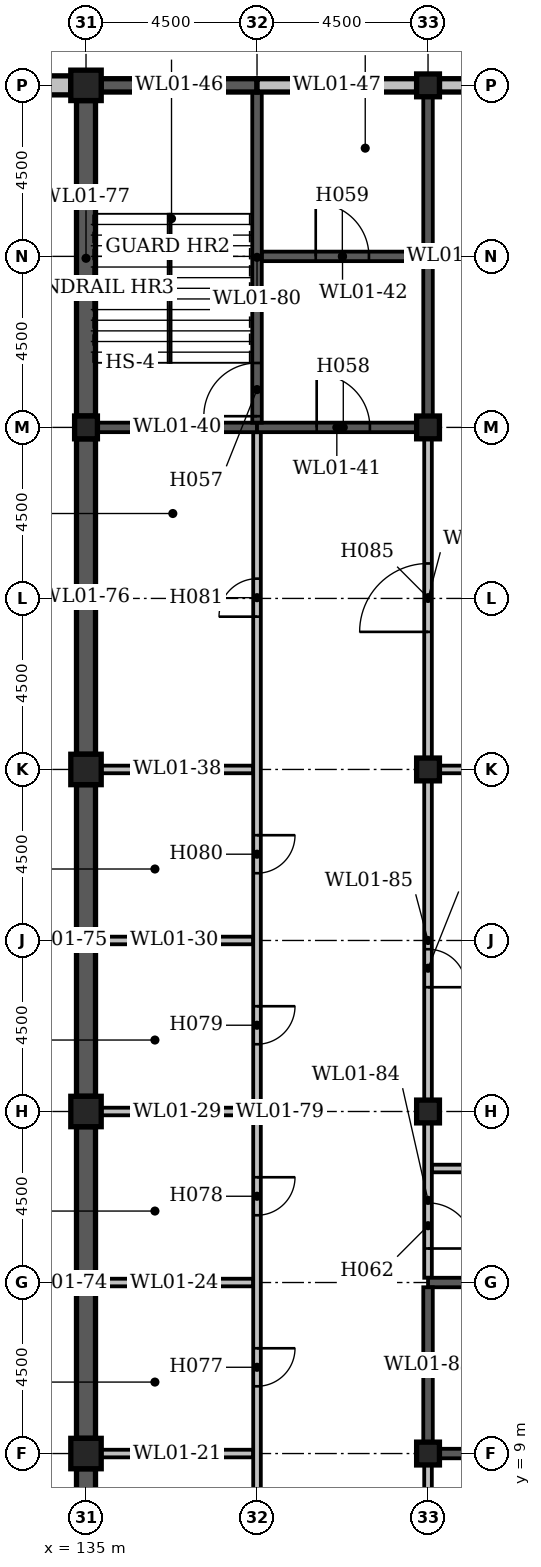
"""IFC4 building model, lengths in metres.
Left out: names, types, materials, properties, quantities, classifications, styles, units other than length and angle.
Written with IfcOpenShell. Run it as: python <this file> out.ifc"""

import sys

from ifc_helpers import new_model, si_unit, direction, frame, frame_2d, origin, origin_2d, place, context, subcontext, project, spatial, rectangle, extrude, element, fill, save


model = new_model("IFC4")
c1 = context("Model", 3, precision=1e-05, world=origin(), true_north=direction((0.0, 1.0)))
c2 = subcontext(c1, "Body", "Model", "MODEL_VIEW")
j1 = project(units=[si_unit("LENGTHUNIT", "METRE"), si_unit("PLANEANGLEUNIT", "RADIAN")], contexts=[c1])
p1 = place(None, origin())
s1 = spatial("IfcSite", under=j1, at=p1, CompositionType="ELEMENT")
p2 = place(p1, origin())
s2 = spatial("IfcBuilding", under=s1, at=p2, CompositionType="ELEMENT")
p3 = place(p2, frame((0.0, 0.0, 9.0)))
s3 = spatial("IfcBuildingStorey", under=s2, at=p3, CompositionType="ELEMENT", Elevation=9.0)
for number, where, z_axis, x_axis in (
    (1, (135.0, 9.0, -0.3), (0.0, 0.0, 1.0), (1.0, 0.0, 0.0)),
    (2, (135.0, 18.0, -0.3), (0.0, 0.0, 1.0), (1.0, 0.0, 0.0)),
    (3, (135.0, 27.0, -0.3), (0.0, 0.0, 1.0), (1.0, 0.0, 0.0)),
):
    element("IfcColumn", number, at=place(p3, frame(where, z_axis=z_axis, x_axis=x_axis)), inside=s3, PredefinedType="COLUMN", context=c2, shape_type="SweptSolid", body=[
        extrude(rectangle(XDim=0.8, YDim=0.8, at=origin_2d()), origin(), (0.0, 0.0, 1.0), 5.0),
    ])
p4 = place(p3, frame((135.0, 36.0, -0.3), z_axis=(0.0, 0.0, 1.0), x_axis=(1.0, 0.0, 0.0)))
e4 = element("IfcColumn", 4, at=p4, inside=s3, PredefinedType="COLUMN", context=c2, shape_type="SweptSolid", body=[
    extrude(rectangle(XDim=0.6, YDim=0.6, at=origin_2d()), origin(), (0.0, 0.0, 1.0), 5.0),
])
p5 = place(p3, frame((135.0, 45.0, -0.3), z_axis=(0.0, 0.0, 1.0), x_axis=(1.0, 0.0, 0.0)))
e5 = element("IfcColumn", 5, at=p5, inside=s3, PredefinedType="COLUMN", context=c2, shape_type="SweptSolid", body=[
    extrude(rectangle(XDim=0.8, YDim=0.8, at=origin_2d()), origin(), (0.0, 0.0, 1.0), 5.0),
])
for number, where, z_axis, x_axis in (
    (6, (144.0, 9.0, 0.0), (0.0, 0.0, 1.0), (1.0, 0.0, 0.0)),
    (7, (144.0, 18.0, 0.0), (0.0, 0.0, 1.0), (1.0, 0.0, 0.0)),
    (8, (144.0, 27.0, 0.0), (0.0, 0.0, 1.0), (1.0, 0.0, 0.0)),
    (9, (144.0, 36.0, 0.0), (0.0, 0.0, 1.0), (1.0, 0.0, 0.0)),
    (10, (144.0, 45.0, 0.0), (0.0, 0.0, 1.0), (1.0, 0.0, 0.0)),
):
    element("IfcColumn", number, at=place(p3, frame(where, z_axis=z_axis, x_axis=x_axis)), inside=s3, PredefinedType="COLUMN", context=c2, shape_type="SweptSolid", body=[
        extrude(rectangle(XDim=0.6, YDim=0.6, at=origin_2d()), origin(), (0.0, 0.0, 1.0), 4.7),
    ])
p6 = place(p3, frame((135.4, 9.0, 0.0), z_axis=(0.0, 0.0, 1.0), x_axis=(1.0, 0.0, 0.0)))
e11 = element("IfcWall", 11, at=p6, inside=s3, PredefinedType="STANDARD", context=c2, shape_type="SweptSolid", body=[
    extrude(rectangle(XDim=4.0, YDim=0.2, at=frame_2d((2.0, 0.0))), origin(), (0.0, 0.0, 1.0), 4.7),
])
p7 = place(p3, frame((144.3, 9.0, 0.0), z_axis=(0.0, 0.0, 1.0), x_axis=(1.0, 0.0, 0.0)))
e12 = element("IfcWall", 12, at=p7, inside=s3, PredefinedType="STANDARD", context=c2, shape_type="SweptSolid", body=[
    extrude(rectangle(XDim=4.2, YDim=0.25, at=frame_2d((2.1, 0.0))), origin(), (0.0, 0.0, 1.0), 5.0),
])
p8 = place(p3, frame((135.25, 13.5, 0.0), z_axis=(0.0, 0.0, 1.0), x_axis=(1.0, 0.0, 0.0)))
e13 = element("IfcWall", 13, at=p8, inside=s3, PredefinedType="STANDARD", context=c2, shape_type="SweptSolid", body=[
    extrude(rectangle(XDim=4.15, YDim=0.2, at=frame_2d((2.075, 0.0))), origin(), (0.0, 0.0, 1.0), 4.7),
])
p9 = place(p3, frame((144.0, 13.5, 0.0), z_axis=(0.0, 0.0, 1.0), x_axis=(1.0, 0.0, 0.0)))
e14 = element("IfcWall", 14, at=p9, inside=s3, PredefinedType="STANDARD", context=c2, shape_type="SweptSolid", body=[
    extrude(rectangle(XDim=4.5, YDim=0.25, at=frame_2d((2.25, 0.0))), origin(), (0.0, 0.0, 1.0), 5.0),
])
p10 = place(p9, frame((1.72, 0.0, 0.0)))
e15 = element("IfcOpeningElement", 15, at=p10, cuts=e14, PredefinedType="OPENING", context=c2, shape_type="SweptSolid", body=[
    extrude(rectangle(XDim=1.1, YDim=2.1, at=frame_2d((0.55, 1.05))), frame((0.0, 0.137, 0.0), z_axis=(0.0, -1.0, 0.0), x_axis=(1.0, 0.0, 0.0)), (0.0, 0.0, 1.0), 0.274),
])
p11 = place(p3, frame((144.1, 16.5, 0.0), z_axis=(0.0, 0.0, 1.0), x_axis=(1.0, 0.0, 0.0)))
e16 = element("IfcWall", 16, at=p11, inside=s3, PredefinedType="STANDARD", context=c2, shape_type="SweptSolid", body=[
    extrude(rectangle(XDim=8.725, YDim=0.2, at=frame_2d((4.362, 0.0))), origin(), (0.0, 0.0, 1.0), 4.7),
])
p12 = place(p3, frame((135.4, 18.0, 0.0), z_axis=(0.0, 0.0, 1.0), x_axis=(1.0, 0.0, 0.0)))
e17 = element("IfcWall", 17, at=p12, inside=s3, PredefinedType="STANDARD", context=c2, shape_type="SweptSolid", body=[
    extrude(rectangle(XDim=4.0, YDim=0.2, at=frame_2d((2.0, 0.0))), origin(), (0.0, 0.0, 1.0), 4.7),
])
p13 = place(p3, frame((135.25, 22.5, 0.0), z_axis=(0.0, 0.0, 1.0), x_axis=(1.0, 0.0, 0.0)))
e18 = element("IfcWall", 18, at=p13, inside=s3, PredefinedType="STANDARD", context=c2, shape_type="SweptSolid", body=[
    extrude(rectangle(XDim=4.15, YDim=0.2, at=frame_2d((2.075, 0.0))), origin(), (0.0, 0.0, 1.0), 4.7),
])
p14 = place(p3, frame((135.4, 27.0, 0.0), z_axis=(0.0, 0.0, 1.0), x_axis=(1.0, 0.0, 0.0)))
e19 = element("IfcWall", 19, at=p14, inside=s3, PredefinedType="STANDARD", context=c2, shape_type="SweptSolid", body=[
    extrude(rectangle(XDim=4.0, YDim=0.2, at=frame_2d((2.0, 0.0))), origin(), (0.0, 0.0, 1.0), 4.7),
])
p15 = place(p3, frame((144.3, 27.0, 0.0), z_axis=(0.0, 0.0, 1.0), x_axis=(1.0, 0.0, 0.0)))
e20 = element("IfcWall", 20, at=p15, inside=s3, PredefinedType="STANDARD", context=c2, shape_type="SweptSolid", body=[
    extrude(rectangle(XDim=8.4, YDim=0.2, at=frame_2d((4.2, 0.0))), origin(), (0.0, 0.0, 1.0), 4.7),
])
p16 = place(p3, frame((135.3, 36.0, 0.0), z_axis=(0.0, 0.0, 1.0), x_axis=(1.0, 0.0, 0.0)))
e21 = element("IfcWall", 21, at=p16, inside=s3, PredefinedType="STANDARD", context=c2, shape_type="SweptSolid", body=[
    extrude(rectangle(XDim=4.2, YDim=0.25, at=frame_2d((2.1, 0.0))), origin(), (0.0, 0.0, 1.0), 5.0),
])
p17 = place(p3, frame((139.5, 36.0, 0.0), z_axis=(0.0, 0.0, 1.0), x_axis=(1.0, 0.0, 0.0)))
e22 = element("IfcWall", 22, at=p17, inside=s3, PredefinedType="STANDARD", context=c2, shape_type="SweptSolid", body=[
    extrude(rectangle(XDim=4.2, YDim=0.25, at=frame_2d((2.1, 0.0))), origin(), (0.0, 0.0, 1.0), 4.7),
])
p18 = place(p17, frame((1.57, 0.0, 0.0)))
e23 = element("IfcOpeningElement", 23, at=p18, cuts=e22, PredefinedType="OPENING", context=c2, shape_type="SweptSolid", body=[
    extrude(rectangle(XDim=1.4, YDim=2.1, at=frame_2d((0.7, 1.05))), frame((0.0, 0.137, 0.0), z_axis=(0.0, -1.0, 0.0), x_axis=(1.0, 0.0, 0.0)), (0.0, 0.0, 1.0), 0.274),
])
p19 = place(p3, frame((139.625, 40.5, 0.0), z_axis=(0.0, 0.0, 1.0), x_axis=(1.0, 0.0, 0.0)))
e24 = element("IfcWall", 24, at=p19, inside=s3, PredefinedType="STANDARD", context=c2, shape_type="SweptSolid", body=[
    extrude(rectangle(XDim=4.25, YDim=0.25, at=frame_2d((2.125, 0.0))), origin(), (0.0, 0.0, 1.0), 4.7),
])
p20 = place(p19, frame((1.42, 0.0, 0.0)))
e25 = element("IfcOpeningElement", 25, at=p20, cuts=e24, PredefinedType="OPENING", context=c2, shape_type="SweptSolid", body=[
    extrude(rectangle(XDim=1.4, YDim=2.1, at=frame_2d((0.7, 1.05))), frame((0.0, 0.137, 0.0), z_axis=(0.0, -1.0, 0.0), x_axis=(1.0, 0.0, 0.0)), (0.0, 0.0, 1.0), 0.274),
])
p21 = place(p3, frame((126.3, 45.0, 0.0), z_axis=(0.0, 0.0, 1.0), x_axis=(1.0, 0.0, 0.0)))
e26 = element("IfcWall", 26, at=p21, inside=s3, PredefinedType="STANDARD", context=c2, shape_type="SweptSolid", body=[
    extrude(rectangle(XDim=8.3, YDim=0.5, at=frame_2d((4.15, 0.0))), origin(), (0.0, 0.0, 1.0), 5.0),
])
p22 = place(p3, frame((135.4, 45.0, 0.0), z_axis=(0.0, 0.0, 1.0), x_axis=(1.0, 0.0, 0.0)))
e27 = element("IfcWall", 27, at=p22, inside=s3, PredefinedType="STANDARD", context=c2, shape_type="SweptSolid", body=[
    extrude(rectangle(XDim=4.1, YDim=0.35, at=frame_2d((2.05, 0.0))), origin(), (0.0, 0.0, 1.0), 5.0),
])
p23 = place(p3, frame((139.5, 45.0, 0.0), z_axis=(0.0, 0.0, 1.0), x_axis=(1.0, 0.0, 0.0)))
e28 = element("IfcWall", 28, at=p23, inside=s3, PredefinedType="STANDARD", context=c2, shape_type="SweptSolid", body=[
    extrude(rectangle(XDim=4.2, YDim=0.35, at=frame_2d((2.1, 0.0))), origin(), (0.0, 0.0, 1.0), 4.1),
])
p24 = place(p3, frame((144.3, 45.0, 0.0), z_axis=(0.0, 0.0, 1.0), x_axis=(1.0, 0.0, 0.0)))
e29 = element("IfcWall", 29, at=p24, inside=s3, PredefinedType="STANDARD", context=c2, shape_type="SweptSolid", body=[
    extrude(rectangle(XDim=8.35, YDim=0.35, at=frame_2d((4.175, 0.0))), origin(), (0.0, 0.0, 1.0), 4.1),
])
p25 = place(p24, frame((1.337, 0.0, 1.0)))
e30 = element("IfcOpeningElement", 30, at=p25, cuts=e29, PredefinedType="OPENING", context=c2, shape_type="SweptSolid", body=[
    extrude(rectangle(XDim=1.5, YDim=2.4, at=frame_2d((0.75, 1.2))), frame((0.0, 0.187, 0.0), z_axis=(0.0, -1.0, 0.0), x_axis=(1.0, 0.0, 0.0)), (0.0, 0.0, 1.0), 0.374),
])
p26 = place(p24, frame((5.512, 0.0, 1.0)))
e31 = element("IfcOpeningElement", 31, at=p26, cuts=e29, PredefinedType="OPENING", context=c2, shape_type="SweptSolid", body=[
    extrude(rectangle(XDim=1.5, YDim=2.4, at=frame_2d((0.75, 1.2))), frame((0.0, 0.187, 0.0), z_axis=(0.0, -1.0, 0.0), x_axis=(1.0, 0.0, 0.0)), (0.0, 0.0, 1.0), 0.374),
])
for number, where, z_axis, x_axis in (
    (32, (135.0, 0.4, 0.0), (0.0, 0.0, 1.0), (0.0, 1.0, 0.0)),
    (33, (135.0, 9.4, 0.0), (0.0, 0.0, 1.0), (0.0, 1.0, 0.0)),
    (34, (135.0, 18.4, 0.0), (0.0, 0.0, 1.0), (0.0, 1.0, 0.0)),
):
    element("IfcWall", number, at=place(p3, frame(where, z_axis=z_axis, x_axis=x_axis)), inside=s3, PredefinedType="STANDARD", context=c2, shape_type="SweptSolid", body=[
        extrude(rectangle(XDim=8.2, YDim=0.5, at=frame_2d((4.1, 0.0))), origin(), (0.0, 0.0, 1.0), 5.0),
    ])
for number, where, z_axis, x_axis in (
    (35, (135.0, 27.4, 0.0), (0.0, 0.0, 1.0), (0.0, 1.0, 0.0)),
    (36, (135.0, 36.3, 0.0), (0.0, 0.0, 1.0), (0.0, 1.0, 0.0)),
):
    element("IfcWall", number, at=place(p3, frame(where, z_axis=z_axis, x_axis=x_axis)), inside=s3, PredefinedType="STANDARD", context=c2, shape_type="SweptSolid", body=[
        extrude(rectangle(XDim=8.3, YDim=0.5, at=frame_2d((4.15, 0.0))), origin(), (0.0, 0.0, 1.0), 5.0),
    ])
p27 = place(p3, frame((139.5, 0.1, 0.0), z_axis=(0.0, 0.0, 1.0), x_axis=(0.0, 1.0, 0.0)))
e37 = element("IfcWall", 37, at=p27, inside=s3, PredefinedType="STANDARD", context=c2, shape_type="SweptSolid", body=[
    extrude(rectangle(XDim=35.775, YDim=0.2, at=frame_2d((17.887, 0.0))), origin(), (0.0, 0.0, 1.0), 4.7),
])
p28 = place(p27, frame((6.17, 0.0, 0.0)))
e38 = element("IfcOpeningElement", 38, at=p28, cuts=e37, PredefinedType="OPENING", context=c2, shape_type="SweptSolid", body=[
    extrude(rectangle(XDim=1.0, YDim=2.1, at=frame_2d((0.5, 1.05))), frame((0.0, 0.112, 0.0), z_axis=(0.0, -1.0, 0.0), x_axis=(1.0, 0.0, 0.0)), (0.0, 0.0, 1.0), 0.224),
])
p29 = place(p27, frame((10.67, 0.0, 0.0)))
e39 = element("IfcOpeningElement", 39, at=p29, cuts=e37, PredefinedType="OPENING", context=c2, shape_type="SweptSolid", body=[
    extrude(rectangle(XDim=1.0, YDim=2.1, at=frame_2d((0.5, 1.05))), frame((0.0, 0.112, 0.0), z_axis=(0.0, -1.0, 0.0), x_axis=(1.0, 0.0, 0.0)), (0.0, 0.0, 1.0), 0.224),
])
p30 = place(p27, frame((15.17, 0.0, 0.0)))
e40 = element("IfcOpeningElement", 40, at=p30, cuts=e37, PredefinedType="OPENING", context=c2, shape_type="SweptSolid", body=[
    extrude(rectangle(XDim=1.0, YDim=2.1, at=frame_2d((0.5, 1.05))), frame((0.0, 0.112, 0.0), z_axis=(0.0, -1.0, 0.0), x_axis=(1.0, 0.0, 0.0)), (0.0, 0.0, 1.0), 0.224),
])
p31 = place(p27, frame((19.67, 0.0, 0.0)))
e41 = element("IfcOpeningElement", 41, at=p31, cuts=e37, PredefinedType="OPENING", context=c2, shape_type="SweptSolid", body=[
    extrude(rectangle(XDim=1.0, YDim=2.1, at=frame_2d((0.5, 1.05))), frame((0.0, 0.112, 0.0), z_axis=(0.0, -1.0, 0.0), x_axis=(1.0, 0.0, 0.0)), (0.0, 0.0, 1.0), 0.224),
])
p32 = place(p27, frame((24.17, 0.0, 0.0)))
e42 = element("IfcOpeningElement", 42, at=p32, cuts=e37, PredefinedType="OPENING", context=c2, shape_type="SweptSolid", body=[
    extrude(rectangle(XDim=1.0, YDim=2.1, at=frame_2d((0.5, 1.05))), frame((0.0, 0.112, 0.0), z_axis=(0.0, -1.0, 0.0), x_axis=(1.0, 0.0, 0.0)), (0.0, 0.0, 1.0), 0.224),
])
p33 = place(p27, frame((30.92, 0.0, 0.0)))
e43 = element("IfcOpeningElement", 43, at=p33, cuts=e37, PredefinedType="OPENING", context=c2, shape_type="SweptSolid", body=[
    extrude(rectangle(XDim=1.0, YDim=2.1, at=frame_2d((0.5, 1.05))), frame((0.0, 0.112, 0.0), z_axis=(0.0, -1.0, 0.0), x_axis=(1.0, 0.0, 0.0)), (0.0, 0.0, 1.0), 0.224),
])
p34 = place(p3, frame((139.5, 36.125, 0.0), z_axis=(0.0, 0.0, 1.0), x_axis=(0.0, 1.0, 0.0)))
e44 = element("IfcWall", 44, at=p34, inside=s3, PredefinedType="STANDARD", context=c2, shape_type="SweptSolid", body=[
    extrude(rectangle(XDim=8.7, YDim=0.25, at=frame_2d((4.35, 0.0))), origin(), (0.0, 0.0, 1.0), 5.0),
])
p35 = place(p34, frame((0.17, 0.0, 0.0)))
e45 = element("IfcOpeningElement", 45, at=p35, cuts=e44, PredefinedType="OPENING", context=c2, shape_type="SweptSolid", body=[
    extrude(rectangle(XDim=1.4, YDim=2.1, at=frame_2d((0.7, 1.05))), frame((0.0, 0.137, 0.0), z_axis=(0.0, -1.0, 0.0), x_axis=(1.0, 0.0, 0.0)), (0.0, 0.0, 1.0), 0.274),
])
p36 = place(p3, frame((144.0, 0.3, 0.0), z_axis=(0.0, 0.0, 1.0), x_axis=(0.0, 1.0, 0.0)))
e46 = element("IfcWall", 46, at=p36, inside=s3, PredefinedType="STANDARD", context=c2, shape_type="SweptSolid", body=[
    extrude(rectangle(XDim=8.4, YDim=0.2, at=frame_2d((4.2, 0.0))), origin(), (0.0, 0.0, 1.0), 4.7),
])
p37 = place(p36, frame((3.32, 0.0, 0.0)))
e47 = element("IfcOpeningElement", 47, at=p37, cuts=e46, PredefinedType="OPENING", context=c2, shape_type="SweptSolid", body=[
    extrude(rectangle(XDim=1.8, YDim=2.4, at=frame_2d((0.9, 1.2))), frame((0.0, 0.112, 0.0), z_axis=(0.0, -1.0, 0.0), x_axis=(1.0, 0.0, 0.0)), (0.0, 0.0, 1.0), 0.224),
])
p38 = place(p3, frame((144.0, 9.3, 0.0), z_axis=(0.0, 0.0, 1.0), x_axis=(0.0, 1.0, 0.0)))
e48 = element("IfcWall", 48, at=p38, inside=s3, PredefinedType="STANDARD", context=c2, shape_type="SweptSolid", body=[
    extrude(rectangle(XDim=4.075, YDim=0.25, at=frame_2d((2.038, 0.0))), origin(), (0.0, 0.0, 1.0), 5.0),
])
p39 = place(p3, frame((144.0, 13.625, 0.0), z_axis=(0.0, 0.0, 1.0), x_axis=(0.0, 1.0, 0.0)))
e49 = element("IfcWall", 49, at=p39, inside=s3, PredefinedType="STANDARD", context=c2, shape_type="SweptSolid", body=[
    extrude(rectangle(XDim=4.075, YDim=0.2, at=frame_2d((2.038, 0.0))), origin(), (0.0, 0.0, 1.0), 4.7),
])
p40 = place(p39, frame((0.77, 0.0, 0.0)))
e50 = element("IfcOpeningElement", 50, at=p40, cuts=e49, PredefinedType="OPENING", context=c2, shape_type="SweptSolid", body=[
    extrude(rectangle(XDim=1.2, YDim=2.1, at=frame_2d((0.6, 1.05))), frame((0.0, 0.112, 0.0), z_axis=(0.0, -1.0, 0.0), x_axis=(1.0, 0.0, 0.0)), (0.0, 0.0, 1.0), 0.224),
])
p41 = place(p3, frame((144.0, 18.3, 0.0), z_axis=(0.0, 0.0, 1.0), x_axis=(0.0, 1.0, 0.0)))
e51 = element("IfcWall", 51, at=p41, inside=s3, PredefinedType="STANDARD", context=c2, shape_type="SweptSolid", body=[
    extrude(rectangle(XDim=8.4, YDim=0.2, at=frame_2d((4.2, 0.0))), origin(), (0.0, 0.0, 1.0), 4.7),
])
p42 = place(p41, frame((2.97, 0.0, 0.0)))
e52 = element("IfcOpeningElement", 52, at=p42, cuts=e51, PredefinedType="OPENING", context=c2, shape_type="SweptSolid", body=[
    extrude(rectangle(XDim=1.0, YDim=2.1, at=frame_2d((0.5, 1.05))), frame((0.0, 0.112, 0.0), z_axis=(0.0, -1.0, 0.0), x_axis=(1.0, 0.0, 0.0)), (0.0, 0.0, 1.0), 0.224),
])
p43 = place(p3, frame((144.0, 27.3, 0.0), z_axis=(0.0, 0.0, 1.0), x_axis=(0.0, 1.0, 0.0)))
e53 = element("IfcWall", 53, at=p43, inside=s3, PredefinedType="STANDARD", context=c2, shape_type="SweptSolid", body=[
    extrude(rectangle(XDim=8.4, YDim=0.2, at=frame_2d((4.2, 0.0))), origin(), (0.0, 0.0, 1.0), 4.7),
])
p44 = place(p43, frame((3.32, 0.0, 0.0)))
e54 = element("IfcOpeningElement", 54, at=p44, cuts=e53, PredefinedType="OPENING", context=c2, shape_type="SweptSolid", body=[
    extrude(rectangle(XDim=1.8, YDim=2.4, at=frame_2d((0.9, 1.2))), frame((0.0, 0.112, 0.0), z_axis=(0.0, -1.0, 0.0), x_axis=(1.0, 0.0, 0.0)), (0.0, 0.0, 1.0), 0.224),
])
p45 = place(p3, frame((144.0, 36.3, 0.0), z_axis=(0.0, 0.0, 1.0), x_axis=(0.0, 1.0, 0.0)))
e55 = element("IfcWall", 55, at=p45, inside=s3, PredefinedType="STANDARD", context=c2, shape_type="SweptSolid", body=[
    extrude(rectangle(XDim=8.4, YDim=0.25, at=frame_2d((4.2, 0.0))), origin(), (0.0, 0.0, 1.0), 4.7),
])
p46 = place(p35, origin())
e56 = element("IfcDoor", 56, at=p46, inside=s3, OperationType="DOUBLE_DOOR_SINGLE_SWING", PredefinedType="DOOR", context=c2, shape_type="SweptSolid", body=[
    extrude(rectangle(XDim=1.4, YDim=2.1, at=frame_2d((0.7, 1.05))), frame((0.0, 0.025, 0.0), z_axis=(0.0, -1.0, 0.0), x_axis=(1.0, 0.0, 0.0)), (0.0, 0.0, 1.0), 0.05),
])
fill(e45, e56)
p47 = place(p18, origin())
e57 = element("IfcDoor", 57, at=p47, inside=s3, OperationType="DOUBLE_DOOR_SINGLE_SWING", PredefinedType="DOOR", context=c2, shape_type="SweptSolid", body=[
    extrude(rectangle(XDim=1.4, YDim=2.1, at=frame_2d((0.7, 1.05))), frame((0.0, 0.025, 0.0), z_axis=(0.0, -1.0, 0.0), x_axis=(1.0, 0.0, 0.0)), (0.0, 0.0, 1.0), 0.05),
])
fill(e23, e57)
p48 = place(p20, origin())
e58 = element("IfcDoor", 58, at=p48, inside=s3, OperationType="DOUBLE_DOOR_SINGLE_SWING", PredefinedType="DOOR", context=c2, shape_type="SweptSolid", body=[
    extrude(rectangle(XDim=1.4, YDim=2.1, at=frame_2d((0.7, 1.05))), frame((0.0, 0.025, 0.0), z_axis=(0.0, -1.0, 0.0), x_axis=(1.0, 0.0, 0.0)), (0.0, 0.0, 1.0), 0.05),
])
fill(e25, e58)
p49 = place(p40, frame((1.2, 0.0, 0.0), z_axis=(0.0, 0.0, 1.0), x_axis=(-1.0, 0.0, 0.0)))
e59 = element("IfcDoor", 59, at=p49, inside=s3, OperationType="SINGLE_SWING_RIGHT", PredefinedType="DOOR", context=c2, shape_type="SweptSolid", body=[
    extrude(rectangle(XDim=1.2, YDim=2.1, at=frame_2d((0.6, 1.05))), frame((0.0, 0.025, 0.0), z_axis=(0.0, -1.0, 0.0), x_axis=(1.0, 0.0, 0.0)), (0.0, 0.0, 1.0), 0.05),
])
fill(e50, e59)
p50 = place(p29, origin())
e60 = element("IfcDoor", 60, at=p50, inside=s3, OperationType="SINGLE_SWING_RIGHT", PredefinedType="DOOR", context=c2, shape_type="SweptSolid", body=[
    extrude(rectangle(XDim=1.0, YDim=2.1, at=frame_2d((0.5, 1.05))), frame((0.0, 0.025, 0.0), z_axis=(0.0, -1.0, 0.0), x_axis=(1.0, 0.0, 0.0)), (0.0, 0.0, 1.0), 0.05),
])
fill(e39, e60)
p51 = place(p30, origin())
e61 = element("IfcDoor", 61, at=p51, inside=s3, OperationType="SINGLE_SWING_RIGHT", PredefinedType="DOOR", context=c2, shape_type="SweptSolid", body=[
    extrude(rectangle(XDim=1.0, YDim=2.1, at=frame_2d((0.5, 1.05))), frame((0.0, 0.025, 0.0), z_axis=(0.0, -1.0, 0.0), x_axis=(1.0, 0.0, 0.0)), (0.0, 0.0, 1.0), 0.05),
])
fill(e40, e61)
p52 = place(p31, origin())
e62 = element("IfcDoor", 62, at=p52, inside=s3, OperationType="SINGLE_SWING_RIGHT", PredefinedType="DOOR", context=c2, shape_type="SweptSolid", body=[
    extrude(rectangle(XDim=1.0, YDim=2.1, at=frame_2d((0.5, 1.05))), frame((0.0, 0.025, 0.0), z_axis=(0.0, -1.0, 0.0), x_axis=(1.0, 0.0, 0.0)), (0.0, 0.0, 1.0), 0.05),
])
fill(e41, e62)
p53 = place(p32, origin())
e63 = element("IfcDoor", 63, at=p53, inside=s3, OperationType="SINGLE_SWING_RIGHT", PredefinedType="DOOR", context=c2, shape_type="SweptSolid", body=[
    extrude(rectangle(XDim=1.0, YDim=2.1, at=frame_2d((0.5, 1.05))), frame((0.0, 0.025, 0.0), z_axis=(0.0, -1.0, 0.0), x_axis=(1.0, 0.0, 0.0)), (0.0, 0.0, 1.0), 0.05),
])
fill(e42, e63)
p54 = place(p33, origin())
e64 = element("IfcDoor", 64, at=p54, inside=s3, OperationType="SINGLE_SWING_LEFT", PredefinedType="DOOR", context=c2, shape_type="SweptSolid", body=[
    extrude(rectangle(XDim=1.0, YDim=2.1, at=frame_2d((0.5, 1.05))), frame((0.0, 0.025, 0.0), z_axis=(0.0, -1.0, 0.0), x_axis=(1.0, 0.0, 0.0)), (0.0, 0.0, 1.0), 0.05),
])
fill(e43, e64)
p55 = place(p42, frame((1.0, 0.0, 0.0), z_axis=(0.0, 0.0, 1.0), x_axis=(-1.0, 0.0, 0.0)))
e65 = element("IfcDoor", 65, at=p55, inside=s3, OperationType="SINGLE_SWING_RIGHT", PredefinedType="DOOR", context=c2, shape_type="SweptSolid", body=[
    extrude(rectangle(XDim=1.0, YDim=2.1, at=frame_2d((0.5, 1.05))), frame((0.0, 0.025, 0.0), z_axis=(0.0, -1.0, 0.0), x_axis=(1.0, 0.0, 0.0)), (0.0, 0.0, 1.0), 0.05),
])
fill(e52, e65)
p56 = place(p44, origin())
e66 = element("IfcDoor", 66, at=p56, inside=s3, OperationType="DOUBLE_DOOR_SINGLE_SWING", PredefinedType="DOOR", context=c2, shape_type="SweptSolid", body=[
    extrude(rectangle(XDim=1.8, YDim=2.4, at=frame_2d((0.9, 1.2))), frame((0.0, 0.025, 0.0), z_axis=(0.0, -1.0, 0.0), x_axis=(1.0, 0.0, 0.0)), (0.0, 0.0, 1.0), 0.05),
])
fill(e54, e66)
save(model, sys.argv[1])
